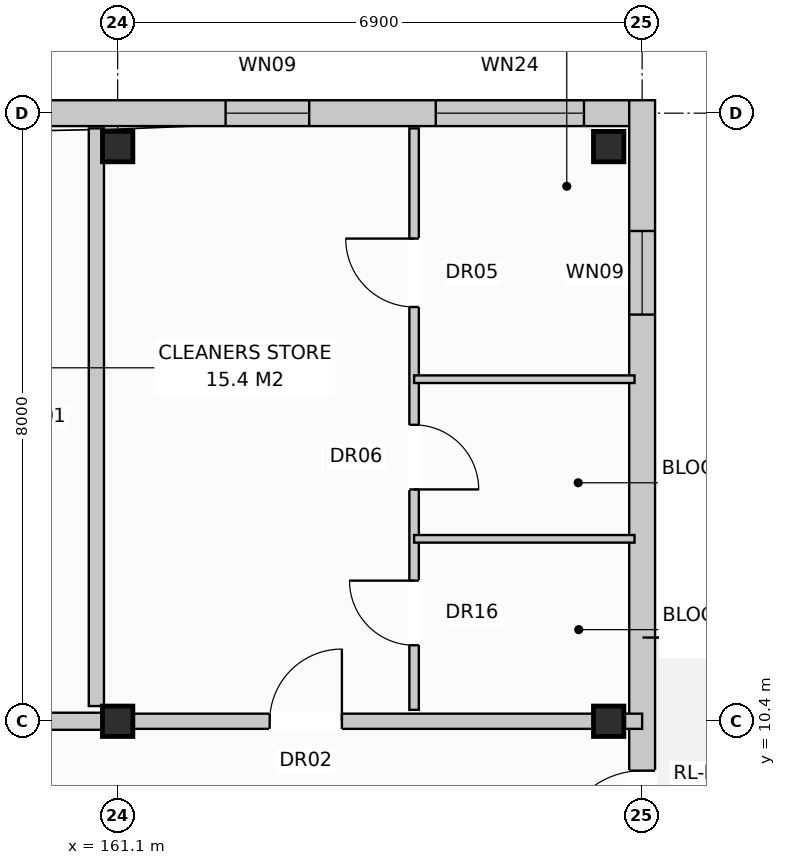
"""IFC4 building model, lengths in metres.
Left out: names, types, materials, properties, quantities, classifications, styles, units other than length and angle.
Written with IfcOpenShell. Run it as: python <this file> out.ifc"""

import sys

from ifc_helpers import new_model, si_unit, direction, frame, frame_2d, origin, origin_with_axes, origin_2d, place, context, subcontext, project, spatial, rectangle, extrude, element, fill, save


model = new_model("IFC4")
c1 = context("Model", 3, precision=1e-05, world=origin(), true_north=direction((0.0, 1.0)))
c2 = subcontext(c1, "Body", "Model", "MODEL_VIEW")
j1 = project(units=[si_unit("LENGTHUNIT", "METRE"), si_unit("PLANEANGLEUNIT", "RADIAN")], contexts=[c1])
p1 = place(None, origin())
s1 = spatial("IfcSite", under=j1, at=p1, CompositionType="ELEMENT")
p2 = place(p1, origin())
s2 = spatial("IfcBuilding", under=s1, at=p2, CompositionType="ELEMENT")
p3 = place(p2, frame((0.0, 0.0, 27.2)))
s3 = spatial("IfcBuildingStorey", under=s2, at=p3, CompositionType="ELEMENT", Elevation=27.2)
for number, where, z_axis, x_axis in (
    (1, (161.1, 10.4, 0.0), (0.0, 0.0, 1.0), (1.0, 0.0, 0.0)),
    (2, (161.1, 17.96, 0.0), (0.0, 0.0, 1.0), (1.0, 0.0, 0.0)),
    (3, (167.56, 10.4, 0.0), (0.0, 0.0, 1.0), (1.0, 0.0, 0.0)),
    (4, (167.56, 17.96, 0.0), (0.0, 0.0, 1.0), (1.0, 0.0, 0.0)),
):
    element("IfcColumn", number, at=place(p3, frame(where, z_axis=z_axis, x_axis=x_axis)), inside=s3, PredefinedType="COLUMN", context=c2, shape_type="SweptSolid", body=[
        extrude(rectangle(XDim=0.4, YDim=0.4, at=origin_2d()), origin(), (0.0, 0.0, 1.0), 3.2),
    ])
p4 = place(p3, frame((150.95, 18.4, 0.0), z_axis=(0.0, 0.0, 1.0), x_axis=(1.0, 0.0, 0.0)))
e5 = element("IfcWall", 5, at=p4, inside=s3, PredefinedType="STANDARD", context=c2, shape_type="SweptSolid", body=[
    extrude(rectangle(XDim=16.89, YDim=0.34, at=frame_2d((8.445, 0.0))), origin(), (0.0, 0.0, 1.0), 2.91),
])
p5 = place(p4, frame((11.57, 0.0, 0.72)))
e6 = element("IfcOpeningElement", 6, at=p5, cuts=e5, PredefinedType="OPENING", context=c2, shape_type="SweptSolid", body=[
    extrude(rectangle(XDim=1.1, YDim=1.5, at=frame_2d((0.55, 0.75))), frame((0.0, 0.182, 0.0), z_axis=(0.0, -1.0, 0.0), x_axis=(1.0, 0.0, 0.0)), (0.0, 0.0, 1.0), 0.364),
])
p6 = place(p4, frame((14.335, 0.0, 0.8)))
e7 = element("IfcOpeningElement", 7, at=p6, cuts=e5, PredefinedType="OPENING", context=c2, shape_type="SweptSolid", body=[
    extrude(rectangle(XDim=1.95, YDim=1.65, at=frame_2d((0.975, 0.825))), frame((0.0, 0.182, 0.0), z_axis=(0.0, -1.0, 0.0), x_axis=(1.0, 0.0, 0.0)), (0.0, 0.0, 1.0), 0.364),
])
p7 = place(p3, frame((168.0, -0.17, 0.0), z_axis=(0.0, 0.0, 1.0), x_axis=(0.0, 1.0, 0.0)))
e8 = element("IfcWall", 8, at=p7, inside=s3, PredefinedType="STANDARD", context=c2, shape_type="SweptSolid", body=[
    extrude(rectangle(XDim=18.74, YDim=0.34, at=frame_2d((9.37, 0.0))), origin(), (0.0, 0.0, 1.0), 2.91),
])
p8 = place(p7, frame((8.82, 0.0, 0.0)))
e9 = element("IfcOpeningElement", 9, at=p8, cuts=e8, PredefinedType="OPENING", context=c2, shape_type="SweptSolid", body=[
    extrude(rectangle(XDim=1.1, YDim=2.1, at=frame_2d((0.55, 1.05))), frame((0.0, 0.182, 0.0), z_axis=(0.0, -1.0, 0.0), x_axis=(1.0, 0.0, 0.0)), (0.0, 0.0, 1.0), 0.364),
])
p9 = place(p7, frame((1.72, 0.0, 0.72)))
e10 = element("IfcOpeningElement", 10, at=p9, cuts=e8, PredefinedType="OPENING", context=c2, shape_type="SweptSolid", body=[
    extrude(rectangle(XDim=1.1, YDim=1.5, at=frame_2d((0.55, 0.75))), frame((0.0, 0.182, 0.0), z_axis=(0.0, -1.0, 0.0), x_axis=(1.0, 0.0, 0.0)), (0.0, 0.0, 1.0), 0.364),
])
p10 = place(p7, frame((15.92, 0.0, 0.72)))
e11 = element("IfcOpeningElement", 11, at=p10, cuts=e8, PredefinedType="OPENING", context=c2, shape_type="SweptSolid", body=[
    extrude(rectangle(XDim=1.1, YDim=1.5, at=frame_2d((0.55, 0.75))), frame((0.0, 0.182, 0.0), z_axis=(0.0, -1.0, 0.0), x_axis=(1.0, 0.0, 0.0)), (0.0, 0.0, 1.0), 0.364),
])
p11 = place(p3, frame((160.82, 10.6, 0.0), z_axis=(0.0, 0.0, 1.0), x_axis=(0.0, 1.0, 0.0)))
e12 = element("IfcWall", 12, at=p11, inside=s3, PredefinedType="PARTITIONING", context=c2, shape_type="SweptSolid", body=[
    extrude(rectangle(XDim=7.6, YDim=0.2, at=frame_2d((3.8, 0.0))), origin(), (0.0, 0.0, 1.0), 2.35),
])
p12 = place(p3, frame((151.1, 10.4, 0.0), z_axis=(0.0, 0.0, 1.0), x_axis=(1.0, 0.0, 0.0)))
e13 = element("IfcWall", 13, at=p12, inside=s3, PredefinedType="PARTITIONING", context=c2, shape_type="SweptSolid", body=[
    extrude(rectangle(XDim=10.0, YDim=0.225, at=frame_2d((5.0, 0.0))), origin(), (0.0, 0.0, 1.0), 2.35),
])
p13 = place(p12, frame((0.475, 0.0, 0.0)))
e14 = element("IfcOpeningElement", 14, at=p13, cuts=e13, PredefinedType="OPENING", context=c2, shape_type="SweptSolid", body=[
    extrude(rectangle(XDim=1.1, YDim=2.15, at=frame_2d((0.55, 1.075))), frame((0.0, 0.125, 0.0), z_axis=(0.0, -1.0, 0.0), x_axis=(1.0, 0.0, 0.0)), (0.0, 0.0, 1.0), 0.249),
])
p14 = place(p12, frame((5.85, 0.0, 0.0)))
e15 = element("IfcOpeningElement", 15, at=p14, cuts=e13, PredefinedType="OPENING", context=c2, shape_type="SweptSolid", body=[
    extrude(rectangle(XDim=0.9, YDim=2.1, at=frame_2d((0.45, 1.05))), frame((0.0, 0.125, 0.0), z_axis=(0.0, -1.0, 0.0), x_axis=(1.0, 0.0, 0.0)), (0.0, 0.0, 1.0), 0.249),
])
p15 = place(p12, frame((7.9, 0.0, 0.0)))
e16 = element("IfcOpeningElement", 16, at=p15, cuts=e13, PredefinedType="OPENING", context=c2, shape_type="SweptSolid", body=[
    extrude(rectangle(XDim=0.95, YDim=2.15, at=frame_2d((0.475, 1.075))), frame((0.0, 0.125, 0.0), z_axis=(0.0, -1.0, 0.0), x_axis=(1.0, 0.0, 0.0)), (0.0, 0.0, 1.0), 0.249),
])
p16 = place(p3, frame((161.1, 10.4, 0.0), z_axis=(0.0, 0.0, 1.0), x_axis=(1.0, 0.0, 0.0)))
e17 = element("IfcWall", 17, at=p16, inside=s3, PredefinedType="PARTITIONING", context=c2, shape_type="SweptSolid", body=[
    extrude(rectangle(XDim=6.9, YDim=0.2, at=frame_2d((3.45, 0.0))), origin(), (0.0, 0.0, 1.0), 2.35),
])
p17 = place(p16, frame((2.0, 0.0, 0.0)))
e18 = element("IfcOpeningElement", 18, at=p17, cuts=e17, PredefinedType="OPENING", context=c2, shape_type="SweptSolid", body=[
    extrude(rectangle(XDim=0.95, YDim=2.15, at=frame_2d((0.475, 1.075))), frame((0.0, 0.112, 0.0), z_axis=(0.0, -1.0, 0.0), x_axis=(1.0, 0.0, 0.0)), (0.0, 0.0, 1.0), 0.224),
])
p18 = place(p3, frame((165.0, 10.55, 0.0), z_axis=(0.0, 0.0, 1.0), x_axis=(0.0, 1.0, 0.0)))
e19 = element("IfcWall", 19, at=p18, inside=s3, PredefinedType="PARTITIONING", context=c2, shape_type="SweptSolid", body=[
    extrude(rectangle(XDim=7.65, YDim=0.125, at=frame_2d((3.825, 0.0))), origin(), (0.0, 0.0, 1.0), 2.96),
])
p19 = place(p18, frame((0.85, 0.0, 0.0)))
e20 = element("IfcOpeningElement", 20, at=p19, cuts=e19, PredefinedType="OPENING", context=c2, shape_type="SweptSolid", body=[
    extrude(rectangle(XDim=0.85, YDim=2.1, at=frame_2d((0.425, 1.05))), frame((0.0, 0.074, 0.0), z_axis=(0.0, -1.0, 0.0), x_axis=(1.0, 0.0, 0.0)), (0.0, 0.0, 1.0), 0.149),
])
p20 = place(p18, frame((2.9, 0.0, 0.0)))
e21 = element("IfcOpeningElement", 21, at=p20, cuts=e19, PredefinedType="OPENING", context=c2, shape_type="SweptSolid", body=[
    extrude(rectangle(XDim=0.85, YDim=2.05, at=frame_2d((0.425, 1.025))), frame((0.0, 0.074, 0.0), z_axis=(0.0, -1.0, 0.0), x_axis=(1.0, 0.0, 0.0)), (0.0, 0.0, 1.0), 0.149),
])
p21 = place(p18, frame((5.3, 0.0, 0.0)))
e22 = element("IfcOpeningElement", 22, at=p21, cuts=e19, PredefinedType="OPENING", context=c2, shape_type="SweptSolid", body=[
    extrude(rectangle(XDim=0.9, YDim=2.1, at=frame_2d((0.45, 1.05))), frame((0.0, 0.074, 0.0), z_axis=(0.0, -1.0, 0.0), x_axis=(1.0, 0.0, 0.0)), (0.0, 0.0, 1.0), 0.149),
])
for number, where, z_axis, x_axis in (
    (23, (165.0, 12.8, 0.0), (0.0, 0.0, 1.0), (1.0, 0.0, 0.0)),
    (24, (165.0, 14.9, 0.0), (0.0, 0.0, 1.0), (1.0, 0.0, 0.0)),
):
    element("IfcWall", number, at=place(p3, frame(where, z_axis=z_axis, x_axis=x_axis)), inside=s3, PredefinedType="PARTITIONING", context=c2, shape_type="SweptSolid", body=[
        extrude(rectangle(XDim=2.9, YDim=0.1, at=frame_2d((1.45, 0.0))), origin(), (0.0, 0.0, 1.0), 2.96),
    ])
p22 = place(p5, origin_with_axes())
e25 = element("IfcWindow", 25, at=p22, inside=s3, PartitioningType="SINGLE_PANEL", PredefinedType="WINDOW", context=c2, shape_type="SweptSolid", body=[
    extrude(rectangle(XDim=1.1, YDim=1.5, at=frame_2d((0.55, 0.75))), frame((0.0, 0.03, 0.0), z_axis=(0.0, -1.0, 0.0), x_axis=(1.0, 0.0, 0.0)), (0.0, 0.0, 1.0), 0.06),
])
fill(e6, e25)
p23 = place(p6, origin_with_axes())
e26 = element("IfcWindow", 26, at=p23, inside=s3, PartitioningType="SINGLE_PANEL", PredefinedType="WINDOW", context=c2, shape_type="SweptSolid", body=[
    extrude(rectangle(XDim=1.95, YDim=1.65, at=frame_2d((0.975, 0.825))), frame((0.0, 0.03, 0.0), z_axis=(0.0, -1.0, 0.0), x_axis=(1.0, 0.0, 0.0)), (0.0, 0.0, 1.0), 0.06),
])
fill(e7, e26)
p24 = place(p8, origin_with_axes())
e27 = element("IfcDoor", 27, at=p24, inside=s3, OperationType="SINGLE_SWING_LEFT", PredefinedType="DOOR", context=c2, shape_type="SweptSolid", body=[
    extrude(rectangle(XDim=1.1, YDim=2.1, at=frame_2d((0.55, 1.05))), frame((0.0, 0.025, 0.0), z_axis=(0.0, -1.0, 0.0), x_axis=(1.0, 0.0, 0.0)), (0.0, 0.0, 1.0), 0.05),
])
fill(e9, e27)
p25 = place(p10, origin_with_axes())
e28 = element("IfcWindow", 28, at=p25, inside=s3, PartitioningType="SINGLE_PANEL", PredefinedType="WINDOW", context=c2, shape_type="SweptSolid", body=[
    extrude(rectangle(XDim=1.1, YDim=1.5, at=frame_2d((0.55, 0.75))), frame((0.0, 0.03, 0.0), z_axis=(0.0, -1.0, 0.0), x_axis=(1.0, 0.0, 0.0)), (0.0, 0.0, 1.0), 0.06),
])
fill(e11, e28)
p26 = place(p17, origin_with_axes())
e29 = element("IfcDoor", 29, at=p26, inside=s3, OperationType="SINGLE_SWING_RIGHT", PredefinedType="DOOR", context=c2, shape_type="SweptSolid", body=[
    extrude(rectangle(XDim=0.95, YDim=2.15, at=frame_2d((0.475, 1.075))), frame((0.0, 0.025, 0.0), z_axis=(0.0, -1.0, 0.0), x_axis=(1.0, 0.0, 0.0)), (0.0, 0.0, 1.0), 0.05),
])
fill(e18, e29)
p27 = place(p19, origin_with_axes())
e30 = element("IfcDoor", 30, at=p27, inside=s3, OperationType="SINGLE_SWING_RIGHT", PredefinedType="DOOR", context=c2, shape_type="SweptSolid", body=[
    extrude(rectangle(XDim=0.85, YDim=2.1, at=frame_2d((0.425, 1.05))), frame((0.0, 0.025, 0.0), z_axis=(0.0, -1.0, 0.0), x_axis=(1.0, 0.0, 0.0)), (0.0, 0.0, 1.0), 0.05),
])
fill(e20, e30)
p28 = place(p20, frame((0.85, 0.0, 0.0), z_axis=(0.0, 0.0, 1.0), x_axis=(-1.0, 0.0, 0.0)))
e31 = element("IfcDoor", 31, at=p28, inside=s3, OperationType="SINGLE_SWING_LEFT", PredefinedType="DOOR", context=c2, shape_type="SweptSolid", body=[
    extrude(rectangle(XDim=0.85, YDim=2.05, at=frame_2d((0.425, 1.025))), frame((0.0, 0.025, 0.0), z_axis=(0.0, -1.0, 0.0), x_axis=(1.0, 0.0, 0.0)), (0.0, 0.0, 1.0), 0.05),
])
fill(e21, e31)
p29 = place(p21, origin_with_axes())
e32 = element("IfcDoor", 32, at=p29, inside=s3, OperationType="SINGLE_SWING_RIGHT", PredefinedType="DOOR", context=c2, shape_type="SweptSolid", body=[
    extrude(rectangle(XDim=0.9, YDim=2.1, at=frame_2d((0.45, 1.05))), frame((0.0, 0.025, 0.0), z_axis=(0.0, -1.0, 0.0), x_axis=(1.0, 0.0, 0.0)), (0.0, 0.0, 1.0), 0.05),
])
fill(e22, e32)
save(model, sys.argv[1])
